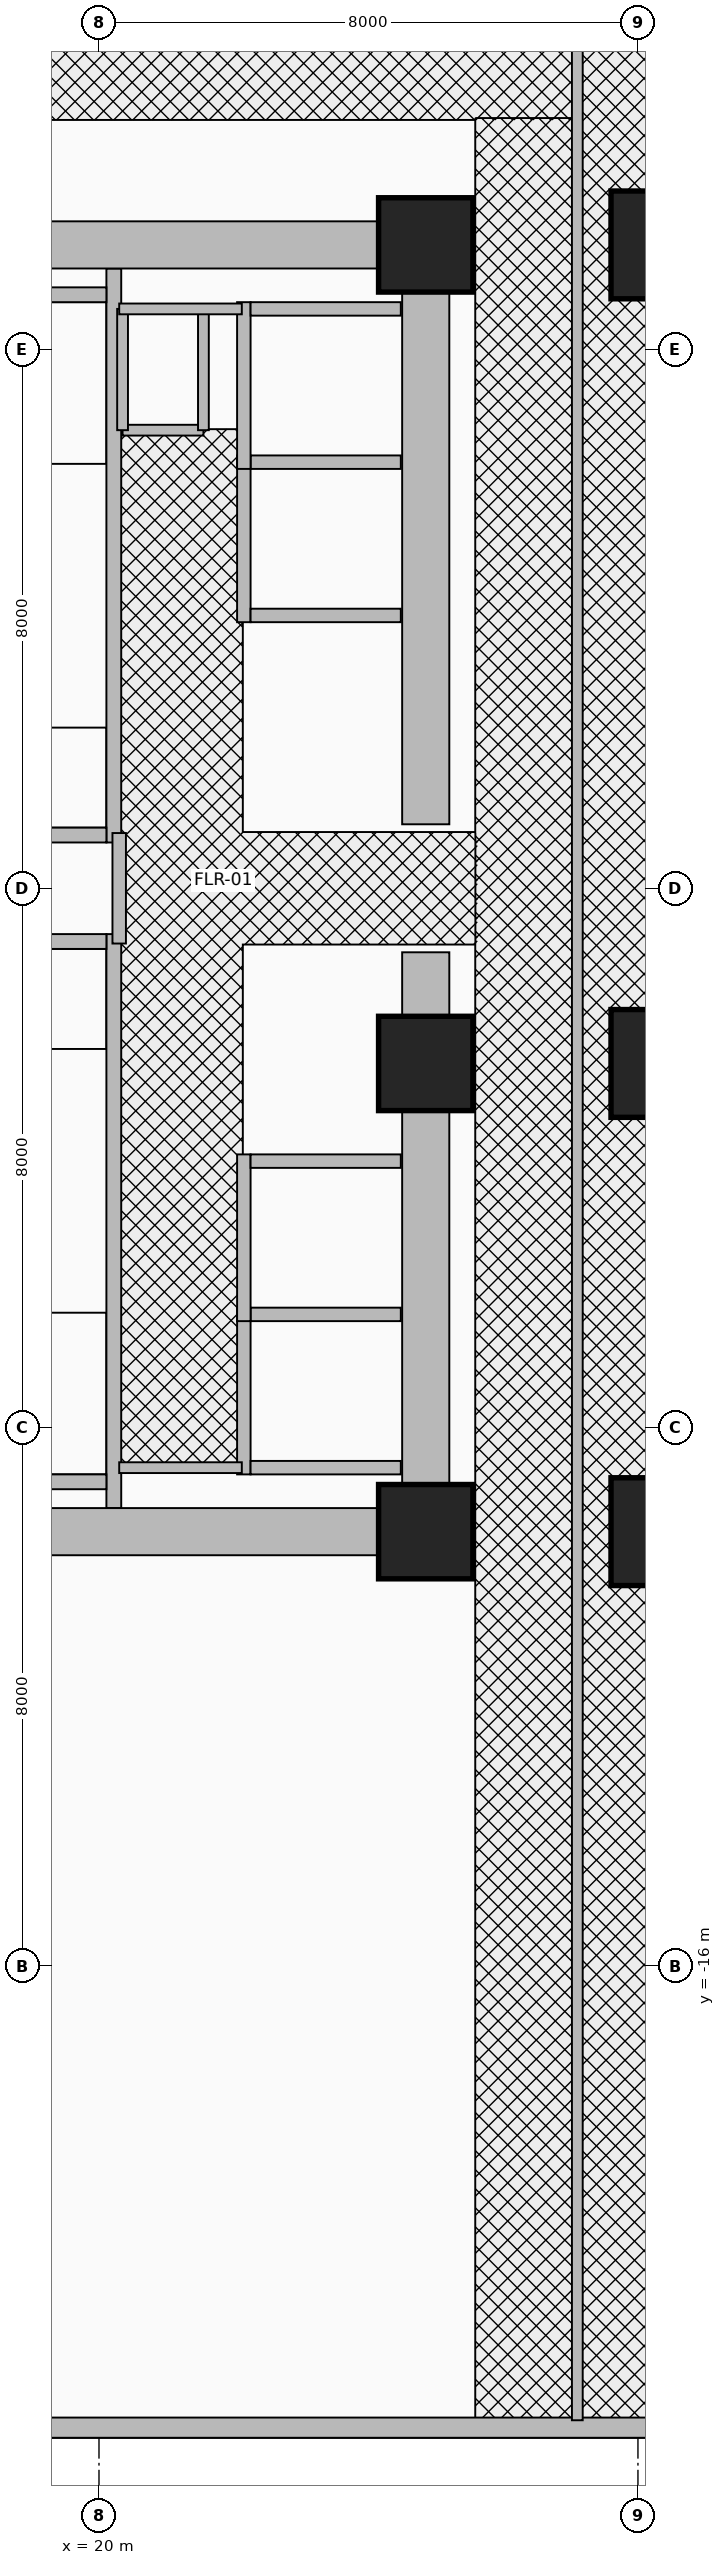
"""IFC4 building model, lengths in metres.
Left out: names, types, materials, properties, quantities, classifications, styles, units other than length and angle.
Written with IfcOpenShell. Run it as: python <this file> out.ifc"""

import sys

from ifc_helpers import new_model, si_unit, direction, frame, frame_2d, origin, origin_2d, place, context, subcontext, project, spatial, rectangle, extrude, source, transform, mapped, element, fill, save


model = new_model("IFC4")
c1 = context("Model", 3, precision=1e-05, world=origin(), true_north=direction((0.0, 1.0)))
c2 = subcontext(c1, "Body", "Model", "MODEL_VIEW")
j1 = project(units=[si_unit("LENGTHUNIT", "METRE"), si_unit("PLANEANGLEUNIT", "RADIAN")], contexts=[c1])
p1 = place(None, origin())
s1 = spatial("IfcSite", under=j1, at=p1, CompositionType="ELEMENT")
p2 = place(p1, origin())
s2 = spatial("IfcBuilding", under=s1, at=p2, CompositionType="ELEMENT")
p3 = place(p2, frame((0.0, 0.0, 5.2)))
s3 = spatial("IfcBuildingStorey", under=s2, at=p3, CompositionType="ELEMENT", Elevation=5.2)
p4 = place(p3, frame((20.22, 0.68, 0.0), z_axis=(0.0, 0.0, 1.0), x_axis=(0.0, 1.0, 0.0)))
e1 = element("IfcWall", 1, at=p4, inside=s3, PredefinedType="SHEAR", context=c2, shape_type="SweptSolid", body=[
    extrude(rectangle(XDim=8.52, YDim=0.22, at=frame_2d((4.26, 0.0))), origin(), (0.0, 0.0, 1.0), 4.92),
])
p5 = place(p3, frame((17.0, 0.79, 0.0), z_axis=(0.0, 0.0, 1.0), x_axis=(1.0, 0.0, 0.0)))
e2 = element("IfcWall", 2, at=p5, inside=s3, PredefinedType="SHEAR", context=c2, shape_type="SweptSolid", body=[
    extrude(rectangle(XDim=3.11, YDim=0.22, at=frame_2d((1.555, 0.0))), origin(), (0.0, 0.0, 1.0), 4.92),
])
p6 = place(p5, frame((0.95, 0.0, 0.0)))
e3 = element("IfcOpeningElement", 3, at=p6, cuts=e2, PredefinedType="OPENING", context=c2, shape_type="SweptSolid", body=[
    extrude(rectangle(XDim=1.1, YDim=2.15, at=frame_2d((0.55, 1.075))), frame((0.0, 0.125, 0.0), z_axis=(0.0, -1.0, 0.0), x_axis=(1.0, 0.0, 0.0)), (0.0, 0.0, 1.0), 0.25),
])
p7 = place(p3, frame((17.0, 8.81, 0.0), z_axis=(0.0, 0.0, 1.0), x_axis=(1.0, 0.0, 0.0)))
e4 = element("IfcWall", 4, at=p7, inside=s3, PredefinedType="SHEAR", context=c2, shape_type="SweptSolid", body=[
    extrude(rectangle(XDim=3.11, YDim=0.22, at=frame_2d((1.555, 0.0))), origin(), (0.0, 0.0, 1.0), 4.92),
])
p8 = place(p3, frame((20.22, -9.2, 0.0), z_axis=(0.0, 0.0, 1.0), x_axis=(0.0, 1.0, 0.0)))
e5 = element("IfcWall", 5, at=p8, inside=s3, PredefinedType="SHEAR", context=c2, shape_type="SweptSolid", body=[
    extrude(rectangle(XDim=8.52, YDim=0.22, at=frame_2d((4.26, 0.0))), origin(), (0.0, 0.0, 1.0), 4.92),
])
p9 = place(p3, frame((17.0, -8.81, 0.0), z_axis=(0.0, 0.0, 1.0), x_axis=(1.0, 0.0, 0.0)))
e6 = element("IfcWall", 6, at=p9, inside=s3, PredefinedType="SHEAR", context=c2, shape_type="SweptSolid", body=[
    extrude(rectangle(XDim=3.11, YDim=0.22, at=frame_2d((1.555, 0.0))), origin(), (0.0, 0.0, 1.0), 4.92),
])
p10 = place(p3, frame((17.0, -0.79, 0.0), z_axis=(0.0, 0.0, 1.0), x_axis=(1.0, 0.0, 0.0)))
e7 = element("IfcWall", 7, at=p10, inside=s3, PredefinedType="SHEAR", context=c2, shape_type="SweptSolid", body=[
    extrude(rectangle(XDim=3.11, YDim=0.22, at=frame_2d((1.555, 0.0))), origin(), (0.0, 0.0, 1.0), 4.92),
])
p11 = place(p10, frame((0.95, 0.0, 0.0)))
e8 = element("IfcOpeningElement", 8, at=p11, cuts=e7, PredefinedType="OPENING", context=c2, shape_type="SweptSolid", body=[
    extrude(rectangle(XDim=1.1, YDim=2.15, at=frame_2d((0.55, 1.075))), frame((0.0, 0.125, 0.0), z_axis=(0.0, -1.0, 0.0), x_axis=(1.0, 0.0, 0.0)), (0.0, 0.0, 1.0), 0.25),
])
for number, where, z_axis, x_axis in (
    (9, (24.85, -9.9, 0.0), (0.0, 0.0, 1.0), (0.0, 1.0, 0.0)),
    (10, (24.85, 0.95, 0.0), (0.0, 0.0, 1.0), (0.0, 1.0, 0.0)),
):
    element("IfcWall", number, at=place(p3, frame(where, z_axis=z_axis, x_axis=x_axis)), inside=s3, PredefinedType="SHEAR", context=c2, shape_type="SweptSolid", body=[
        extrude(rectangle(XDim=8.95, YDim=0.7, at=frame_2d((4.475, 0.0))), origin(), (0.0, 0.0, 1.0), 4.92),
    ])
for number, where, z_axis, x_axis in (
    (11, (15.85, 9.55, 0.0), (0.0, 0.0, 1.0), (1.0, 0.0, 0.0)),
    (12, (15.85, -9.55, 0.0), (0.0, 0.0, 1.0), (1.0, 0.0, 0.0)),
):
    element("IfcWall", number, at=place(p3, frame(where, z_axis=z_axis, x_axis=x_axis)), inside=s3, PredefinedType="SHEAR", context=c2, shape_type="SweptSolid", body=[
        extrude(rectangle(XDim=9.0, YDim=0.7, at=frame_2d((4.5, 0.0))), origin(), (0.0, 0.0, 1.0), 4.92),
    ])
m1 = source(origin(), c2, "Body", "SweptSolid", [
    extrude(rectangle(XDim=1.4, YDim=1.4, at=origin_2d()), origin(), (0.0, 0.0, 1.0), 5.2),
])
p12 = place(p3, frame((24.85, -9.55, 0.0), z_axis=(0.0, 0.0, 1.0), x_axis=(1.0, 0.0, 0.0)))
e13 = element("IfcColumn", 13, at=p12, inside=s3, PredefinedType="COLUMN", context=c2, shape_type="MappedRepresentation", body=[
    mapped(m1, transform((0.0, 0.0, 0.0), x_axis=(1.0, 0.0, 0.0), y_axis=(0.0, 1.0, 0.0), z_axis=(0.0, 0.0, 1.0), scale=1.0)),
])
m2 = source(origin(), c2, "Body", "SweptSolid", [
    extrude(rectangle(XDim=1.6, YDim=1.6, at=origin_2d()), origin(), (0.0, 0.0, 1.0), 5.2),
])
p13 = place(p3, frame((28.4, -9.55, 0.0), z_axis=(0.0, 0.0, 1.0), x_axis=(1.0, 0.0, 0.0)))
e14 = element("IfcColumn", 14, at=p13, inside=s3, PredefinedType="COLUMN", context=c2, shape_type="MappedRepresentation", body=[
    mapped(m2, transform((0.0, 0.0, 0.0), x_axis=(1.0, 0.0, 0.0), y_axis=(0.0, 1.0, 0.0), z_axis=(0.0, 0.0, 1.0), scale=1.0)),
])
p14 = place(p3, frame((24.85, -2.6, 0.0), z_axis=(0.0, 0.0, 1.0), x_axis=(1.0, 0.0, 0.0)))
e15 = element("IfcColumn", 15, at=p14, inside=s3, PredefinedType="COLUMN", context=c2, shape_type="MappedRepresentation", body=[
    mapped(m1, transform((0.0, 0.0, 0.0), x_axis=(1.0, 0.0, 0.0), y_axis=(0.0, 1.0, 0.0), z_axis=(0.0, 0.0, 1.0), scale=1.0)),
])
p15 = place(p3, frame((28.4, -2.6, 0.0), z_axis=(0.0, 0.0, 1.0), x_axis=(1.0, 0.0, 0.0)))
e16 = element("IfcColumn", 16, at=p15, inside=s3, PredefinedType="COLUMN", context=c2, shape_type="MappedRepresentation", body=[
    mapped(m2, transform((0.0, 0.0, 0.0), x_axis=(1.0, 0.0, 0.0), y_axis=(0.0, 1.0, 0.0), z_axis=(0.0, 0.0, 1.0), scale=1.0)),
])
p16 = place(p3, frame((24.85, 9.55, 0.0), z_axis=(0.0, 0.0, 1.0), x_axis=(1.0, 0.0, 0.0)))
e17 = element("IfcColumn", 17, at=p16, inside=s3, PredefinedType="COLUMN", context=c2, shape_type="MappedRepresentation", body=[
    mapped(m1, transform((0.0, 0.0, 0.0), x_axis=(1.0, 0.0, 0.0), y_axis=(0.0, 1.0, 0.0), z_axis=(0.0, 0.0, 1.0), scale=1.0)),
])
p17 = place(p3, frame((28.4, 9.55, 0.0), z_axis=(0.0, 0.0, 1.0), x_axis=(1.0, 0.0, 0.0)))
e18 = element("IfcColumn", 18, at=p17, inside=s3, PredefinedType="COLUMN", context=c2, shape_type="MappedRepresentation", body=[
    mapped(m2, transform((0.0, 0.0, 0.0), x_axis=(1.0, 0.0, 0.0), y_axis=(0.0, 1.0, 0.0), z_axis=(0.0, 0.0, 1.0), scale=1.0)),
])
p18 = place(p3, frame((12.15, -22.85, 0.0), z_axis=(0.0, 0.0, 1.0), x_axis=(1.0, 0.0, 0.0)))
e19 = element("IfcWall", 19, at=p18, inside=s3, PredefinedType="SOLIDWALL", context=c2, shape_type="SweptSolid", body=[
    extrude(rectangle(XDim=21.7, YDim=0.3, at=frame_2d((10.85, 0.0))), origin(), (0.0, 0.0, 1.0), 4.92),
])
p19 = place(p18, frame((3.2, 0.0, 0.9)))
e20 = element("IfcOpeningElement", 20, at=p19, cuts=e19, PredefinedType="OPENING", context=c2, shape_type="SweptSolid", body=[
    extrude(rectangle(XDim=1.5, YDim=1.75, at=frame_2d((0.75, 0.875))), frame((0.0, 0.165, 0.0), z_axis=(0.0, -1.0, 0.0), x_axis=(1.0, 0.0, 0.0)), (0.0, 0.0, 1.0), 0.33),
])
p20 = place(p18, frame((9.8, 0.0, 0.9)))
e21 = element("IfcOpeningElement", 21, at=p20, cuts=e19, PredefinedType="OPENING", context=c2, shape_type="SweptSolid", body=[
    extrude(rectangle(XDim=1.5, YDim=1.75, at=frame_2d((0.75, 0.875))), frame((0.0, 0.165, 0.0), z_axis=(0.0, -1.0, 0.0), x_axis=(1.0, 0.0, 0.0)), (0.0, 0.0, 1.0), 0.33),
])
p21 = place(p18, frame((17.6, 0.0, 0.9)))
e22 = element("IfcOpeningElement", 22, at=p21, cuts=e19, PredefinedType="OPENING", context=c2, shape_type="SweptSolid", body=[
    extrude(rectangle(XDim=1.5, YDim=1.75, at=frame_2d((0.75, 0.875))), frame((0.0, 0.165, 0.0), z_axis=(0.0, -1.0, 0.0), x_axis=(1.0, 0.0, 0.0)), (0.0, 0.0, 1.0), 0.33),
])
p22 = place(p3, frame((22.15, -8.7, 0.0), z_axis=(0.0, 0.0, 1.0), x_axis=(0.0, 1.0, 0.0)))
e23 = element("IfcWall", 23, at=p22, inside=s3, PredefinedType="MOVABLE", context=c2, shape_type="SweptSolid", body=[
    extrude(rectangle(XDim=2.475, YDim=0.2, at=frame_2d((1.237, 0.0))), origin(), (0.0, 0.0, 1.0), 4.92),
])
p23 = place(p22, frame((0.688, 0.0, 0.0)))
e24 = element("IfcOpeningElement", 24, at=p23, cuts=e23, PredefinedType="OPENING", context=c2, shape_type="SweptSolid", body=[
    extrude(rectangle(XDim=1.1, YDim=2.1, at=frame_2d((0.55, 1.05))), frame((0.0, 0.115, 0.0), z_axis=(0.0, -1.0, 0.0), x_axis=(1.0, 0.0, 0.0)), (0.0, 0.0, 1.0), 0.23),
])
for number, where, z_axis, x_axis in (
    (25, (22.25, -8.6, 0.0), (0.0, 0.0, 1.0), (1.0, 0.0, 0.0)),
    (26, (22.25, -6.325, 0.0), (0.0, 0.0, 1.0), (1.0, 0.0, 0.0)),
):
    element("IfcWall", number, at=place(p3, frame(where, z_axis=z_axis, x_axis=x_axis)), inside=s3, PredefinedType="MOVABLE", context=c2, shape_type="SweptSolid", body=[
        extrude(rectangle(XDim=2.23, YDim=0.2, at=frame_2d((1.115, 0.0))), origin(), (0.0, 0.0, 1.0), 4.92),
    ])
p24 = place(p3, frame((22.15, -6.425, 0.0), z_axis=(0.0, 0.0, 1.0), x_axis=(0.0, 1.0, 0.0)))
e27 = element("IfcWall", 27, at=p24, inside=s3, PredefinedType="MOVABLE", context=c2, shape_type="SweptSolid", body=[
    extrude(rectangle(XDim=2.475, YDim=0.2, at=frame_2d((1.238, 0.0))), origin(), (0.0, 0.0, 1.0), 4.92),
])
p25 = place(p24, frame((0.688, 0.0, 0.0)))
e28 = element("IfcOpeningElement", 28, at=p25, cuts=e27, PredefinedType="OPENING", context=c2, shape_type="SweptSolid", body=[
    extrude(rectangle(XDim=1.1, YDim=2.1, at=frame_2d((0.55, 1.05))), frame((0.0, 0.115, 0.0), z_axis=(0.0, -1.0, 0.0), x_axis=(1.0, 0.0, 0.0)), (0.0, 0.0, 1.0), 0.23),
])
p26 = place(p3, frame((22.25, -4.05, 0.0), z_axis=(0.0, 0.0, 1.0), x_axis=(1.0, 0.0, 0.0)))
e29 = element("IfcWall", 29, at=p26, inside=s3, PredefinedType="MOVABLE", context=c2, shape_type="SweptSolid", body=[
    extrude(rectangle(XDim=2.23, YDim=0.2, at=frame_2d((1.115, 0.0))), origin(), (0.0, 0.0, 1.0), 4.92),
])
p27 = place(p3, frame((22.15, 3.95, 0.0), z_axis=(0.0, 0.0, 1.0), x_axis=(0.0, 1.0, 0.0)))
e30 = element("IfcWall", 30, at=p27, inside=s3, PredefinedType="MOVABLE", context=c2, shape_type="SweptSolid", body=[
    extrude(rectangle(XDim=2.475, YDim=0.2, at=frame_2d((1.238, 0.0))), origin(), (0.0, 0.0, 1.0), 4.92),
])
for number, where, z_axis, x_axis in (
    (31, (22.25, 4.05, 0.0), (0.0, 0.0, 1.0), (1.0, 0.0, 0.0)),
    (32, (22.25, 6.325, 0.0), (0.0, 0.0, 1.0), (1.0, 0.0, 0.0)),
):
    element("IfcWall", number, at=place(p3, frame(where, z_axis=z_axis, x_axis=x_axis)), inside=s3, PredefinedType="MOVABLE", context=c2, shape_type="SweptSolid", body=[
        extrude(rectangle(XDim=2.23, YDim=0.2, at=frame_2d((1.115, 0.0))), origin(), (0.0, 0.0, 1.0), 3.745),
    ])
p28 = place(p3, frame((22.15, 6.225, 0.0), z_axis=(0.0, 0.0, 1.0), x_axis=(0.0, 1.0, 0.0)))
e33 = element("IfcWall", 33, at=p28, inside=s3, PredefinedType="MOVABLE", context=c2, shape_type="SweptSolid", body=[
    extrude(rectangle(XDim=2.475, YDim=0.2, at=frame_2d((1.237, 0.0))), origin(), (0.0, 0.0, 1.0), 4.92),
])
p29 = place(p3, frame((22.25, 8.6, 0.0), z_axis=(0.0, 0.0, 1.0), x_axis=(1.0, 0.0, 0.0)))
e34 = element("IfcWall", 34, at=p29, inside=s3, PredefinedType="MOVABLE", context=c2, shape_type="SweptSolid", body=[
    extrude(rectangle(XDim=2.23, YDim=0.2, at=frame_2d((1.115, 0.0))), origin(), (0.0, 0.0, 1.0), 3.745),
])
p30 = place(p3, frame((20.3, -0.82, 0.0), z_axis=(0.0, 0.0, 1.0), x_axis=(0.0, 1.0, 0.0)))
e35 = element("IfcWall", 35, at=p30, inside=s3, PredefinedType="PARTITIONING", context=c2, shape_type="SweptSolid", body=[
    extrude(rectangle(XDim=1.64, YDim=0.2, at=frame_2d((0.82, 0.0))), origin(), (0.0, 0.0, 1.0), 4.92),
])
p31 = place(p30, frame((0.295, 0.0, 0.0)))
e36 = element("IfcOpeningElement", 36, at=p31, cuts=e35, PredefinedType="OPENING", context=c2, shape_type="SweptSolid", body=[
    extrude(rectangle(XDim=1.05, YDim=2.15, at=frame_2d((0.525, 1.075))), frame((0.0, 0.115, 0.0), z_axis=(0.0, -1.0, 0.0), x_axis=(1.0, 0.0, 0.0)), (0.0, 0.0, 1.0), 0.23),
])
p32 = place(p3, frame((20.35, 6.8, 0.0), z_axis=(0.0, 0.0, 1.0), x_axis=(1.0, 0.0, 0.0)))
e37 = element("IfcWall", 37, at=p32, inside=s3, PredefinedType="PARTITIONING", context=c2, shape_type="SweptSolid", body=[
    extrude(rectangle(XDim=1.2, YDim=0.16, at=frame_2d((0.6, 0.0))), origin(), (0.0, 0.0, 1.0), 4.92),
])
p33 = place(p32, frame((0.175, 0.0, 0.0)))
e38 = element("IfcOpeningElement", 38, at=p33, cuts=e37, PredefinedType="OPENING", context=c2, shape_type="SweptSolid", body=[
    extrude(rectangle(XDim=0.85, YDim=2.05, at=frame_2d((0.425, 1.025))), frame((0.0, 0.095, 0.0), z_axis=(0.0, -1.0, 0.0), x_axis=(1.0, 0.0, 0.0)), (0.0, 0.0, 1.0), 0.19),
])
for number, where, z_axis, x_axis in (
    (39, (21.55, 6.8, 0.0), (0.0, 0.0, 1.0), (0.0, 1.0, 0.0)),
    (40, (20.35, 6.8, 0.0), (0.0, 0.0, 1.0), (0.0, 1.0, 0.0)),
):
    element("IfcWall", number, at=place(p3, frame(where, z_axis=z_axis, x_axis=x_axis)), inside=s3, PredefinedType="PARTITIONING", context=c2, shape_type="SweptSolid", body=[
        extrude(rectangle(XDim=1.8, YDim=0.16, at=frame_2d((0.9, 0.0))), origin(), (0.0, 0.0, 1.0), 4.92),
    ])
for number, where, z_axis, x_axis in (
    (41, (20.3, -8.6, 0.0), (0.0, 0.0, 1.0), (1.0, 0.0, 0.0)),
    (42, (20.3, 8.6, 0.0), (0.0, 0.0, 1.0), (1.0, 0.0, 0.0)),
):
    element("IfcWall", number, at=place(p3, frame(where, z_axis=z_axis, x_axis=x_axis)), inside=s3, PredefinedType="PARTITIONING", context=c2, shape_type="SweptSolid", body=[
        extrude(rectangle(XDim=1.82, YDim=0.16, at=frame_2d((0.91, 0.0))), origin(), (0.0, 0.0, 1.0), 4.92),
    ])
p34 = place(p3, frame((27.1, -22.74, 0.0), z_axis=(0.0, 0.0, 1.0), x_axis=(0.0, 1.0, 0.0)))
e43 = element("IfcWall", 43, at=p34, inside=s3, PredefinedType="PARTITIONING", context=c2, shape_type="SweptSolid", body=[
    extrude(rectangle(XDim=45.48, YDim=0.16, at=frame_2d((22.74, 0.0))), origin(), (0.0, 0.0, 1.0), 3.957),
])
p35 = place(p34, frame((7.0, 0.0, 0.0)))
e44 = element("IfcOpeningElement", 44, at=p35, cuts=e43, PredefinedType="OPENING", context=c2, shape_type="SweptSolid", body=[
    extrude(rectangle(XDim=1.8, YDim=2.15, at=frame_2d((0.9, 1.075))), frame((0.0, 0.095, 0.0), z_axis=(0.0, -1.0, 0.0), x_axis=(1.0, 0.0, 0.0)), (0.0, 0.0, 1.0), 0.19),
])
p36 = place(p34, frame((25.0, 0.0, 0.0)))
e45 = element("IfcOpeningElement", 45, at=p36, cuts=e43, PredefinedType="OPENING", context=c2, shape_type="SweptSolid", body=[
    extrude(rectangle(XDim=1.8, YDim=2.15, at=frame_2d((0.9, 1.075))), frame((0.0, 0.095, 0.0), z_axis=(0.0, -1.0, 0.0), x_axis=(1.0, 0.0, 0.0)), (0.0, 0.0, 1.0), 0.19),
])
p37 = place(p20, origin())
e46 = element("IfcWindow", 46, at=p37, inside=s3, PartitioningType="SINGLE_PANEL", PredefinedType="WINDOW", context=c2, shape_type="SweptSolid", body=[
    extrude(rectangle(XDim=1.5, YDim=1.75, at=frame_2d((0.75, 0.875))), frame((0.0, 0.03, 0.0), z_axis=(0.0, -1.0, 0.0), x_axis=(1.0, 0.0, 0.0)), (0.0, 0.0, 1.0), 0.06),
])
fill(e21, e46)
p38 = place(p23, origin())
e47 = element("IfcDoor", 47, at=p38, inside=s3, OperationType="DOUBLE_DOOR_SLIDING", PredefinedType="DOOR", context=c2, shape_type="SweptSolid", body=[
    extrude(rectangle(XDim=1.1, YDim=2.1, at=frame_2d((0.55, 1.05))), frame((0.0, 0.025, 0.0), z_axis=(0.0, -1.0, 0.0), x_axis=(1.0, 0.0, 0.0)), (0.0, 0.0, 1.0), 0.05),
])
fill(e24, e47)
p39 = place(p25, origin())
e48 = element("IfcDoor", 48, at=p39, inside=s3, OperationType="DOUBLE_DOOR_SLIDING", PredefinedType="DOOR", context=c2, shape_type="SweptSolid", body=[
    extrude(rectangle(XDim=1.1, YDim=2.1, at=frame_2d((0.55, 1.05))), frame((0.0, 0.025, 0.0), z_axis=(0.0, -1.0, 0.0), x_axis=(1.0, 0.0, 0.0)), (0.0, 0.0, 1.0), 0.05),
])
fill(e28, e48)
p40 = place(p31, origin())
e49 = element("IfcDoor", 49, at=p40, inside=s3, OperationType="SINGLE_SWING_RIGHT", PredefinedType="DOOR", context=c2, shape_type="SweptSolid", body=[
    extrude(rectangle(XDim=1.05, YDim=2.15, at=frame_2d((0.525, 1.075))), frame((0.0, 0.025, 0.0), z_axis=(0.0, -1.0, 0.0), x_axis=(1.0, 0.0, 0.0)), (0.0, 0.0, 1.0), 0.05),
])
fill(e36, e49)
p41 = place(p33, origin())
e50 = element("IfcDoor", 50, at=p41, inside=s3, OperationType="SINGLE_SWING_LEFT", PredefinedType="DOOR", context=c2, shape_type="SweptSolid", body=[
    extrude(rectangle(XDim=0.85, YDim=2.05, at=frame_2d((0.425, 1.025))), frame((0.0, 0.025, 0.0), z_axis=(0.0, -1.0, 0.0), x_axis=(1.0, 0.0, 0.0)), (0.0, 0.0, 1.0), 0.05),
])
fill(e38, e50)
p42 = place(p35, origin())
e51 = element("IfcDoor", 51, at=p42, inside=s3, OperationType="DOUBLE_DOOR_SINGLE_SWING", PredefinedType="DOOR", context=c2, shape_type="SweptSolid", body=[
    extrude(rectangle(XDim=1.8, YDim=2.15, at=frame_2d((0.9, 1.075))), frame((0.0, 0.025, 0.0), z_axis=(0.0, -1.0, 0.0), x_axis=(1.0, 0.0, 0.0)), (0.0, 0.0, 1.0), 0.05),
])
fill(e44, e51)
p43 = place(p36, frame((1.8, 0.0, 0.0), z_axis=(0.0, 0.0, 1.0), x_axis=(-1.0, 0.0, 0.0)))
e52 = element("IfcDoor", 52, at=p43, inside=s3, OperationType="DOUBLE_DOOR_SINGLE_SWING", PredefinedType="DOOR", context=c2, shape_type="SweptSolid", body=[
    extrude(rectangle(XDim=1.8, YDim=2.15, at=frame_2d((0.9, 1.075))), frame((0.0, 0.025, 0.0), z_axis=(0.0, -1.0, 0.0), x_axis=(1.0, 0.0, 0.0)), (0.0, 0.0, 1.0), 0.05),
])
fill(e45, e52)
save(model, sys.argv[1])
